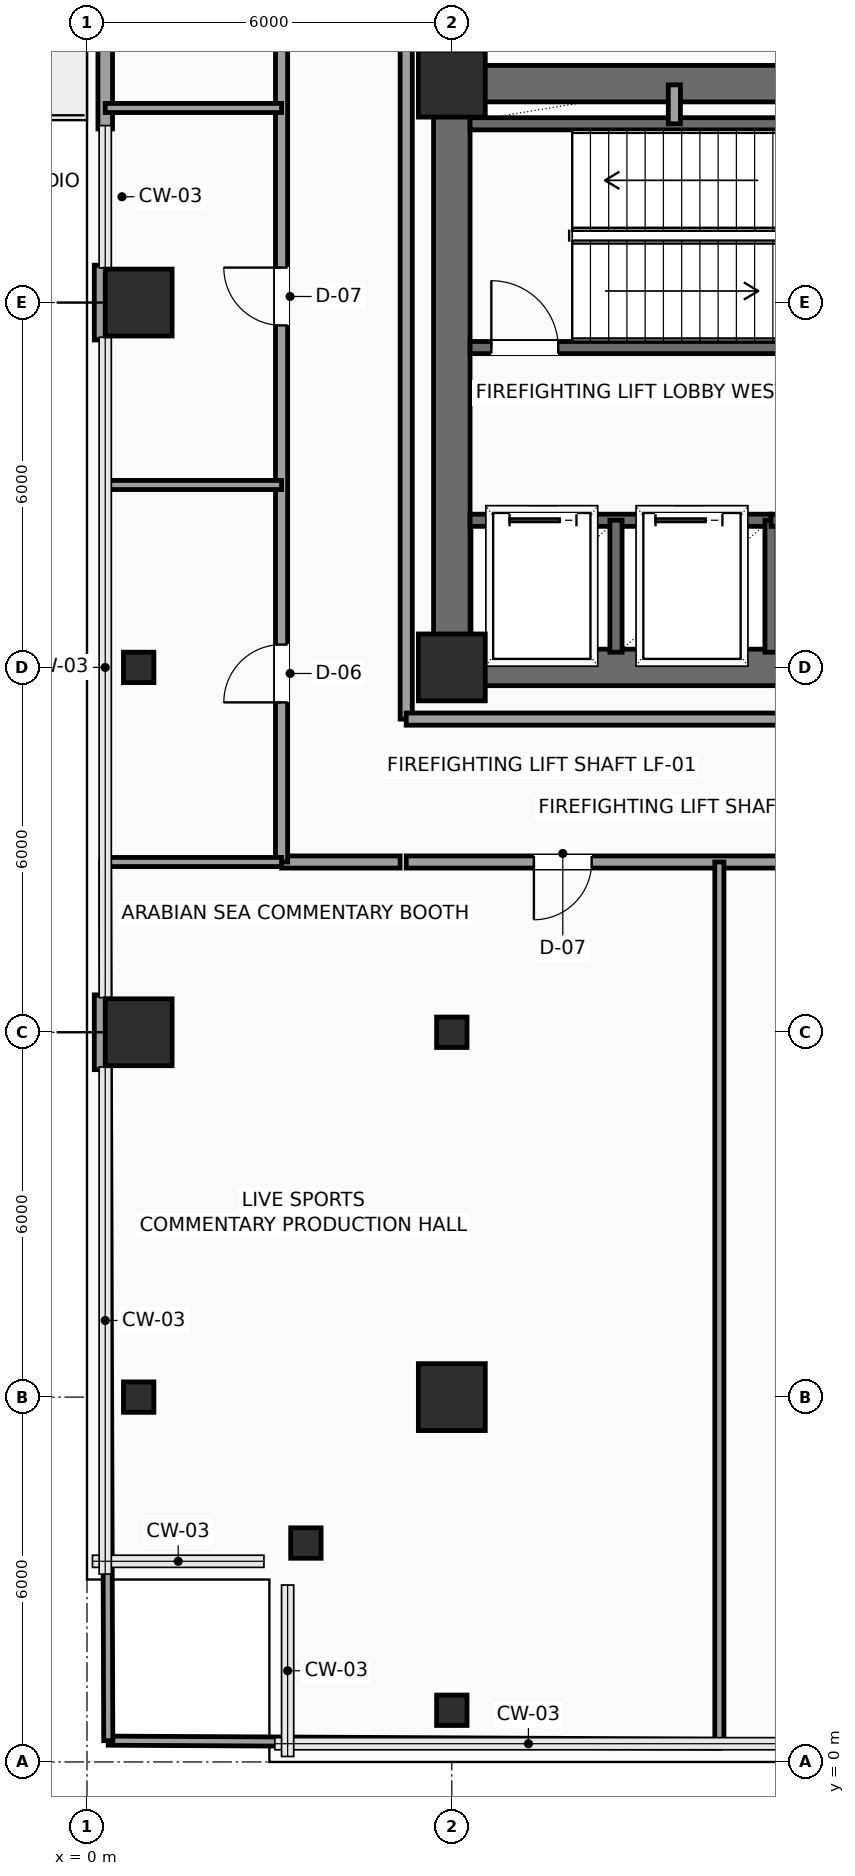
"""IFC4 building model, lengths in metres.
Left out: names, types, materials, properties, quantities, classifications, styles, units other than length and angle.
Written with IfcOpenShell. Run it as: python <this file> out.ifc"""

import sys

from ifc_helpers import new_model, si_unit, direction, frame, frame_2d, origin, origin_2d, place, context, subcontext, project, spatial, rectangle, hollow_rectangle, extrude, element, fill, save


model = new_model("IFC4")
c1 = context("Model", 3, precision=1e-05, world=origin(), true_north=direction((0.0, 1.0)))
c2 = subcontext(c1, "Body", "Model", "MODEL_VIEW")
j1 = project(units=[si_unit("LENGTHUNIT", "METRE"), si_unit("PLANEANGLEUNIT", "RADIAN")], contexts=[c1])
p1 = place(None, origin())
s1 = spatial("IfcSite", under=j1, at=p1, CompositionType="ELEMENT")
p2 = place(p1, origin())
s2 = spatial("IfcBuilding", under=s1, at=p2, CompositionType="ELEMENT")
p3 = place(p2, frame((0.0, 0.0, 107.1)))
s3 = spatial("IfcBuildingStorey", under=s2, at=p3, CompositionType="ELEMENT", Elevation=107.1)
for number, where, z_axis, x_axis in (
    (1, (6.0, 18.0, 0.0), (0.0, 0.0, 1.0), (1.0, 0.0, 0.0)),
    (2, (6.0, 27.6, 0.0), (0.0, 0.0, 1.0), (1.0, 0.0, 0.0)),
):
    element("IfcColumn", number, at=place(p3, frame(where, z_axis=z_axis, x_axis=x_axis)), inside=s3, PredefinedType="COLUMN", context=c2, shape_type="SweptSolid", body=[
        extrude(rectangle(XDim=1.1, YDim=1.1, at=origin_2d()), origin(), (0.0, 0.0, 1.0), 3.75),
    ])
for number, where, z_axis, x_axis in (
    (3, (3.6, 3.6, 0.0), (0.0, 0.0, 1.0), (1.0, 0.0, 0.0)),
    (4, (0.85, 6.0, 0.0), (0.0, 0.0, 1.0), (1.0, 0.0, 0.0)),
):
    element("IfcColumn", number, at=place(p3, frame(where, z_axis=z_axis, x_axis=x_axis)), inside=s3, PredefinedType="COLUMN", context=c2, shape_type="SweptSolid", body=[
        extrude(hollow_rectangle(XDim=0.5, YDim=0.5, WallThickness=0.025, InnerFilletRadius=0.025, OuterFilletRadius=0.04, at=origin_2d()), origin(), (0.0, 0.0, 1.0), 3.75),
    ])
p4 = place(p3, frame((0.85, 12.0, 0.0), z_axis=(0.0, 0.0, 1.0), x_axis=(1.0, 0.0, 0.0)))
e5 = element("IfcColumn", 5, at=p4, inside=s3, PredefinedType="COLUMN", context=c2, shape_type="SweptSolid", body=[
    extrude(rectangle(XDim=1.1, YDim=1.1, at=origin_2d()), origin(), (0.0, 0.0, 1.0), 3.75),
])
p5 = place(p3, frame((0.85, 18.0, 0.0), z_axis=(0.0, 0.0, 1.0), x_axis=(1.0, 0.0, 0.0)))
e6 = element("IfcColumn", 6, at=p5, inside=s3, PredefinedType="COLUMN", context=c2, shape_type="SweptSolid", body=[
    extrude(hollow_rectangle(XDim=0.5, YDim=0.5, WallThickness=0.025, InnerFilletRadius=0.025, OuterFilletRadius=0.04, at=origin_2d()), origin(), (0.0, 0.0, 1.0), 3.75),
])
p6 = place(p3, frame((0.85, 24.0, 0.0), z_axis=(0.0, 0.0, 1.0), x_axis=(1.0, 0.0, 0.0)))
e7 = element("IfcColumn", 7, at=p6, inside=s3, PredefinedType="COLUMN", context=c2, shape_type="SweptSolid", body=[
    extrude(rectangle(XDim=1.1, YDim=1.1, at=origin_2d()), origin(), (0.0, 0.0, 1.0), 3.75),
])
p7 = place(p3, frame((6.0, 0.85, 0.0), z_axis=(0.0, 0.0, 1.0), x_axis=(1.0, 0.0, 0.0)))
e8 = element("IfcColumn", 8, at=p7, inside=s3, PredefinedType="COLUMN", context=c2, shape_type="SweptSolid", body=[
    extrude(hollow_rectangle(XDim=0.5, YDim=0.5, WallThickness=0.025, InnerFilletRadius=0.025, OuterFilletRadius=0.04, at=origin_2d()), origin(), (0.0, 0.0, 1.0), 3.75),
])
p8 = place(p3, frame((6.0, 6.0, 0.0), z_axis=(0.0, 0.0, 1.0), x_axis=(1.0, 0.0, 0.0)))
e9 = element("IfcColumn", 9, at=p8, inside=s3, PredefinedType="COLUMN", context=c2, shape_type="SweptSolid", body=[
    extrude(rectangle(XDim=1.1, YDim=1.1, at=origin_2d()), origin(), (0.0, 0.0, 1.0), 3.75),
])
p9 = place(p3, frame((6.0, 12.0, 0.0), z_axis=(0.0, 0.0, 1.0), x_axis=(1.0, 0.0, 0.0)))
e10 = element("IfcColumn", 10, at=p9, inside=s3, PredefinedType="COLUMN", context=c2, shape_type="SweptSolid", body=[
    extrude(hollow_rectangle(XDim=0.5, YDim=0.5, WallThickness=0.025, InnerFilletRadius=0.025, OuterFilletRadius=0.04, at=origin_2d()), origin(), (0.0, 0.0, 1.0), 3.75),
])
p10 = place(p3, frame((0.3, 26.855, 0.0), z_axis=(0.0, 0.0, 1.0), x_axis=(0.0, 1.0, 0.0)))
e11 = element("IfcWall", 11, at=p10, inside=s3, PredefinedType="SOLIDWALL", context=c2, shape_type="SweptSolid", body=[
    extrude(rectangle(XDim=9.29, YDim=0.24, at=frame_2d((4.645, 0.0))), origin(), (0.0, 0.0, 1.0), 3.475),
])
p11 = place(p10, frame((3.945, 0.0, 0.0)))
e12 = element("IfcOpeningElement", 12, at=p11, cuts=e11, PredefinedType="OPENING", context=c2, shape_type="SweptSolid", body=[
    extrude(rectangle(XDim=1.05, YDim=2.2, at=frame_2d((0.525, 1.1))), frame((0.0, 0.13, 0.0), z_axis=(0.0, -1.0, 0.0), x_axis=(1.0, 0.0, 0.0)), (0.0, 0.0, 1.0), 0.26),
])
for number, where, z_axis, x_axis in (
    (13, (0.24, 11.385, 0.0), (0.0, 0.0, 1.0), (0.0, 1.0, 0.0)),
    (14, (0.24, 23.385, 0.0), (0.0, 0.0, 1.0), (0.0, 1.0, 0.0)),
):
    element("IfcWall", number, at=place(p3, frame(where, z_axis=z_axis, x_axis=x_axis)), inside=s3, PredefinedType="SOLIDWALL", context=c2, shape_type="SweptSolid", body=[
        extrude(rectangle(XDim=1.23, YDim=0.24, at=frame_2d((0.615, 0.0))), origin(), (0.0, 0.0, 1.0), 3.475),
    ])
p12 = place(p3, frame((6.0, 18.0, 0.0), z_axis=(0.0, 0.0, 1.0), x_axis=(1.0, 0.0, 0.0)))
e15 = element("IfcWall", 15, at=p12, inside=s3, PredefinedType="SHEAR", context=c2, shape_type="SweptSolid", body=[
    extrude(rectangle(XDim=12.0, YDim=0.6, at=frame_2d((6.0, 0.0))), origin(), (0.0, 0.0, 1.0), 3.475),
])
p13 = place(p12, frame((7.15, 0.0, 0.0)))
e16 = element("IfcOpeningElement", 16, at=p13, cuts=e15, PredefinedType="OPENING", context=c2, shape_type="SweptSolid", body=[
    extrude(rectangle(XDim=1.6, YDim=2.3, at=frame_2d((0.8, 1.15))), frame((0.0, 0.31, 0.0), z_axis=(0.0, -1.0, 0.0), x_axis=(1.0, 0.0, 0.0)), (0.0, 0.0, 1.0), 0.62),
])
p14 = place(p3, frame((6.0, 27.6, 0.0), z_axis=(0.0, 0.0, 1.0), x_axis=(1.0, 0.0, 0.0)))
e17 = element("IfcWall", 17, at=p14, inside=s3, PredefinedType="SHEAR", context=c2, shape_type="SweptSolid", body=[
    extrude(rectangle(XDim=12.0, YDim=0.6, at=frame_2d((6.0, 0.0))), origin(), (0.0, 0.0, 1.0), 3.475),
])
p15 = place(p14, frame((10.2, 0.0, 0.0)))
e18 = element("IfcOpeningElement", 18, at=p15, cuts=e17, PredefinedType="OPENING", context=c2, shape_type="SweptSolid", body=[
    extrude(rectangle(XDim=0.9, YDim=2.15, at=frame_2d((0.45, 1.075))), frame((0.0, 0.31, 0.0), z_axis=(0.0, -1.0, 0.0), x_axis=(1.0, 0.0, 0.0)), (0.0, 0.0, 1.0), 0.62),
])
p16 = place(p3, frame((6.0, 18.0, 0.0), z_axis=(0.0, 0.0, 1.0), x_axis=(0.0, 1.0, 0.0)))
e19 = element("IfcWall", 19, at=p16, inside=s3, PredefinedType="SHEAR", context=c2, shape_type="SweptSolid", body=[
    extrude(rectangle(XDim=9.6, YDim=0.6, at=frame_2d((4.8, 0.0))), origin(), (0.0, 0.0, 1.0), 3.475),
])
p17 = place(p3, frame((6.3, 23.26, 0.0), z_axis=(0.0, 0.0, 1.0), x_axis=(1.0, 0.0, 0.0)))
e20 = element("IfcWall", 20, at=p17, inside=s3, PredefinedType="SHEAR", context=c2, shape_type="SweptSolid", body=[
    extrude(rectangle(XDim=8.88, YDim=0.2, at=frame_2d((4.44, 0.0))), origin(), (0.0, 0.0, 1.0), 3.475),
])
p18 = place(p17, frame((0.35, 0.0, 0.0)))
e21 = element("IfcOpeningElement", 21, at=p18, cuts=e20, PredefinedType="OPENING", context=c2, shape_type="SweptSolid", body=[
    extrude(rectangle(XDim=1.1, YDim=2.2, at=frame_2d((0.55, 1.1))), frame((0.0, 0.11, 0.0), z_axis=(0.0, -1.0, 0.0), x_axis=(1.0, 0.0, 0.0)), (0.0, 0.0, 1.0), 0.22),
])
p19 = place(p3, frame((6.3, 26.94, 0.0), z_axis=(0.0, 0.0, 1.0), x_axis=(1.0, 0.0, 0.0)))
e22 = element("IfcWall", 22, at=p19, inside=s3, PredefinedType="SHEAR", context=c2, shape_type="SweptSolid", body=[
    extrude(rectangle(XDim=8.88, YDim=0.2, at=frame_2d((4.44, 0.0))), origin(), (0.0, 0.0, 1.0), 3.475),
])
p20 = place(p3, frame((6.3, 20.42, 0.0), z_axis=(0.0, 0.0, 1.0), x_axis=(1.0, 0.0, 0.0)))
e23 = element("IfcWall", 23, at=p20, inside=s3, PredefinedType="SHEAR", context=c2, shape_type="SweptSolid", body=[
    extrude(rectangle(XDim=4.95, YDim=0.2, at=frame_2d((2.475, 0.0))), origin(), (0.0, 0.0, 1.0), 3.475),
])
p21 = place(p20, frame((0.65, 0.0, 0.0)))
e24 = element("IfcOpeningElement", 24, at=p21, cuts=e23, PredefinedType="OPENING", context=c2, shape_type="SweptSolid", body=[
    extrude(rectangle(XDim=1.1, YDim=2.2, at=frame_2d((0.55, 1.1))), frame((0.0, 0.11, 0.0), z_axis=(0.0, -1.0, 0.0), x_axis=(1.0, 0.0, 0.0)), (0.0, 0.0, 1.0), 0.22),
])
p22 = place(p20, frame((3.05, 0.0, 0.0)))
e25 = element("IfcOpeningElement", 25, at=p22, cuts=e23, PredefinedType="OPENING", context=c2, shape_type="SweptSolid", body=[
    extrude(rectangle(XDim=1.1, YDim=2.2, at=frame_2d((0.55, 1.1))), frame((0.0, 0.11, 0.0), z_axis=(0.0, -1.0, 0.0), x_axis=(1.0, 0.0, 0.0)), (0.0, 0.0, 1.0), 0.22),
])
for number, where, z_axis, x_axis in (
    (26, (8.7, 18.25, 0.0), (0.0, 0.0, 1.0), (0.0, 1.0, 0.0)),
    (27, (11.25, 18.25, 0.0), (0.0, 0.0, 1.0), (0.0, 1.0, 0.0)),
):
    element("IfcWall", number, at=place(p3, frame(where, z_axis=z_axis, x_axis=x_axis)), inside=s3, PredefinedType="SHEAR", context=c2, shape_type="SweptSolid", body=[
        extrude(rectangle(XDim=2.17, YDim=0.2, at=frame_2d((1.085, 0.0))), origin(), (0.0, 0.0, 1.0), 3.475),
    ])
p23 = place(p3, frame((11.25, 20.42, 0.0), z_axis=(0.0, 0.0, 1.0), x_axis=(1.0, 0.0, 0.0)))
e28 = element("IfcWall", 28, at=p23, inside=s3, PredefinedType="SHEAR", context=c2, shape_type="SweptSolid", body=[
    extrude(rectangle(XDim=1.4, YDim=0.2, at=frame_2d((0.7, 0.0))), origin(), (0.0, 0.0, 1.0), 3.475),
])
p24 = place(p3, frame((9.66, 26.94, 0.0), z_axis=(0.0, 0.0, 1.0), x_axis=(0.0, 1.0, 0.0)))
e29 = element("IfcWall", 29, at=p24, inside=s3, PredefinedType="SOLIDWALL", context=c2, shape_type="SweptSolid", body=[
    extrude(rectangle(XDim=0.64, YDim=0.2, at=frame_2d((0.32, 0.0))), origin(), (0.0, 0.0, 1.0), 3.475),
])
p25 = place(p3, frame((12.4, 14.8, 0.0), z_axis=(0.0, 0.0, 1.0), x_axis=(-1.0, 0.0, 0.0)))
e30 = element("IfcWall", 30, at=p25, inside=s3, PredefinedType="PARTITIONING", context=c2, shape_type="SweptSolid", body=[
    extrude(rectangle(XDim=7.15, YDim=0.2, at=frame_2d((3.575, 0.0))), origin(), (0.0, 0.0, 1.0), 3.017),
])
p26 = place(p25, frame((4.1, 0.0, 0.0)))
e31 = element("IfcOpeningElement", 31, at=p26, cuts=e30, PredefinedType="OPENING", context=c2, shape_type="SweptSolid", body=[
    extrude(rectangle(XDim=0.95, YDim=2.15, at=frame_2d((0.475, 1.075))), frame((0.0, 0.11, 0.0), z_axis=(0.0, -1.0, 0.0), x_axis=(1.0, 0.0, 0.0)), (0.0, 0.0, 1.0), 0.22),
])
p27 = place(p3, frame((5.15, 14.8, 0.0), z_axis=(0.0, 0.0, 1.0), x_axis=(-1.0, 0.0, 0.0)))
e32 = element("IfcWall", 32, at=p27, inside=s3, PredefinedType="PARTITIONING", context=c2, shape_type="SweptSolid", body=[
    extrude(rectangle(XDim=1.95, YDim=0.2, at=frame_2d((0.975, 0.0))), origin(), (0.0, 0.0, 1.0), 3.017),
])
p28 = place(p3, frame((3.2, 14.8, 0.0), z_axis=(0.0, 0.0, 1.0), x_axis=(0.0, 1.0, 0.0)))
e33 = element("IfcWall", 33, at=p28, inside=s3, PredefinedType="PARTITIONING", context=c2, shape_type="SweptSolid", body=[
    extrude(rectangle(XDim=15.45, YDim=0.2, at=frame_2d((7.725, 0.0))), origin(), (0.0, 0.0, 1.0), 3.475),
])
p29 = place(p28, frame((2.625, 0.0, 0.0)))
e34 = element("IfcOpeningElement", 34, at=p29, cuts=e33, PredefinedType="OPENING", context=c2, shape_type="SweptSolid", body=[
    extrude(rectangle(XDim=0.95, YDim=2.15, at=frame_2d((0.475, 1.075))), frame((0.0, 0.11, 0.0), z_axis=(0.0, -1.0, 0.0), x_axis=(1.0, 0.0, 0.0)), (0.0, 0.0, 1.0), 0.22),
])
p30 = place(p28, frame((8.825, 0.0, 0.0)))
e35 = element("IfcOpeningElement", 35, at=p30, cuts=e33, PredefinedType="OPENING", context=c2, shape_type="SweptSolid", body=[
    extrude(rectangle(XDim=0.95, YDim=2.15, at=frame_2d((0.475, 1.075))), frame((0.0, 0.11, 0.0), z_axis=(0.0, -1.0, 0.0), x_axis=(1.0, 0.0, 0.0)), (0.0, 0.0, 1.0), 0.22),
])
p31 = place(p28, frame((13.45, 0.0, 0.0)))
e36 = element("IfcOpeningElement", 36, at=p31, cuts=e33, PredefinedType="OPENING", context=c2, shape_type="SweptSolid", body=[
    extrude(rectangle(XDim=0.95, YDim=2.15, at=frame_2d((0.475, 1.075))), frame((0.0, 0.11, 0.0), z_axis=(0.0, -1.0, 0.0), x_axis=(1.0, 0.0, 0.0)), (0.0, 0.0, 1.0), 0.22),
])
p32 = place(p3, frame((5.25, 30.25, 0.0), z_axis=(0.0, 0.0, 1.0), x_axis=(0.0, -1.0, 0.0)))
e37 = element("IfcWall", 37, at=p32, inside=s3, PredefinedType="PARTITIONING", context=c2, shape_type="SweptSolid", body=[
    extrude(rectangle(XDim=13.1, YDim=0.2, at=frame_2d((6.55, 0.0))), origin(), (0.0, 0.0, 1.0), 3.475),
])
p33 = place(p3, frame((5.25, 17.15, 0.0), z_axis=(0.0, 0.0, 1.0), x_axis=(1.0, 0.0, 0.0)))
e38 = element("IfcWall", 38, at=p33, inside=s3, PredefinedType="PARTITIONING", context=c2, shape_type="SweptSolid", body=[
    extrude(rectangle(XDim=7.15, YDim=0.2, at=frame_2d((3.575, 0.0))), origin(), (0.0, 0.0, 1.0), 3.475),
])
p34 = place(p3, frame((6.3, 27.68, 0.0), z_axis=(0.0, 0.0, 1.0), x_axis=(0.0, 1.0, 0.0)))
e39 = element("IfcWall", 39, at=p34, inside=s3, PredefinedType="PARTITIONING", context=c2, shape_type="SweptSolid", body=[
    extrude(rectangle(XDim=2.57, YDim=0.15, at=frame_2d((1.285, 0.0))), origin(), (0.0, 0.0, 1.0), 2.967),
])
p35 = place(p3, frame((0.35, 0.35, 0.0), z_axis=(0.0, 0.0, 1.0), x_axis=(0.999987599634, -0.004980017926, 0.0)))
e40 = element("IfcWall", 40, at=p35, inside=s3, PredefinedType="PARTITIONING", context=c2, shape_type="SweptSolid", body=[
    extrude(rectangle(XDim=10.05, YDim=0.15, at=frame_2d((5.025, 0.0))), origin(), (0.0, 0.0, 1.0), 3.475),
])
p36 = place(p3, frame((0.35, 0.35, 0.0), z_axis=(0.0, 0.0, 1.0), x_axis=(-0.003473507221, 0.999993967356, 0.0)))
e41 = element("IfcWall", 41, at=p36, inside=s3, PredefinedType="PARTITIONING", context=c2, shape_type="SweptSolid", body=[
    extrude(rectangle(XDim=11.035, YDim=0.15, at=frame_2d((5.518, 0.0))), origin(), (0.0, 0.0, 1.0), 3.475),
])
p37 = place(p3, frame((0.308, 12.615, 0.0), z_axis=(0.0, 0.0, 1.0), x_axis=(-0.003463666374, 0.99999400149, 0.0)))
e42 = element("IfcWall", 42, at=p37, inside=s3, PredefinedType="PARTITIONING", context=c2, shape_type="SweptSolid", body=[
    extrude(rectangle(XDim=2.185, YDim=0.15, at=frame_2d((1.093, 0.0))), origin(), (0.0, 0.0, 1.0), 3.475),
])
p38 = place(p3, frame((10.4, 0.3, 0.0), z_axis=(0.0, 0.0, 1.0), x_axis=(0.0, 1.0, 0.0)))
e43 = element("IfcWall", 43, at=p38, inside=s3, PredefinedType="PARTITIONING", context=c2, shape_type="SweptSolid", body=[
    extrude(rectangle(XDim=14.5, YDim=0.15, at=frame_2d((7.25, 0.0))), origin(), (0.0, 0.0, 1.0), 3.475),
])
for number, where, z_axis, x_axis in (
    (44, (0.3, 14.8, 0.0), (0.0, 0.0, 1.0), (1.0, 0.0, 0.0)),
    (45, (0.3, 21.0, 0.0), (0.0, 0.0, 1.0), (1.0, 0.0, 0.0)),
):
    element("IfcWall", number, at=place(p3, frame(where, z_axis=z_axis, x_axis=x_axis)), inside=s3, PredefinedType="PARTITIONING", context=c2, shape_type="SweptSolid", body=[
        extrude(rectangle(XDim=2.9, YDim=0.15, at=frame_2d((1.45, 0.0))), origin(), (0.0, 0.0, 1.0), 3.017),
    ])
p39 = place(p3, frame((0.3, 27.2, 0.0), z_axis=(0.0, 0.0, 1.0), x_axis=(1.0, 0.0, 0.0)))
e46 = element("IfcWall", 46, at=p39, inside=s3, PredefinedType="PARTITIONING", context=c2, shape_type="SweptSolid", body=[
    extrude(rectangle(XDim=2.9, YDim=0.15, at=frame_2d((1.45, 0.0))), origin(), (0.0, 0.0, 1.0), 3.475),
])
p40 = place(p18, origin())
e47 = element("IfcDoor", 47, at=p40, inside=s3, OperationType="SINGLE_SWING_LEFT", PredefinedType="DOOR", context=c2, shape_type="SweptSolid", body=[
    extrude(rectangle(XDim=1.1, YDim=2.2, at=frame_2d((0.55, 1.1))), frame((0.0, 0.025, 0.0), z_axis=(0.0, -1.0, 0.0), x_axis=(1.0, 0.0, 0.0)), (0.0, 0.0, 1.0), 0.05),
])
fill(e21, e47)
p41 = place(p21, origin())
e48 = element("IfcDoor", 48, at=p41, inside=s3, OperationType="SLIDING_TO_LEFT", PredefinedType="DOOR", context=c2, shape_type="SweptSolid", body=[
    extrude(rectangle(XDim=1.1, YDim=2.2, at=frame_2d((0.55, 1.1))), frame((0.0, 0.025, 0.0), z_axis=(0.0, -1.0, 0.0), x_axis=(1.0, 0.0, 0.0)), (0.0, 0.0, 1.0), 0.05),
])
fill(e24, e48)
p42 = place(p22, origin())
e49 = element("IfcDoor", 49, at=p42, inside=s3, OperationType="SLIDING_TO_LEFT", PredefinedType="DOOR", context=c2, shape_type="SweptSolid", body=[
    extrude(rectangle(XDim=1.1, YDim=2.2, at=frame_2d((0.55, 1.1))), frame((0.0, 0.025, 0.0), z_axis=(0.0, -1.0, 0.0), x_axis=(1.0, 0.0, 0.0)), (0.0, 0.0, 1.0), 0.05),
])
fill(e25, e49)
p43 = place(p26, origin())
e50 = element("IfcDoor", 50, at=p43, inside=s3, OperationType="SINGLE_SWING_RIGHT", PredefinedType="DOOR", context=c2, shape_type="SweptSolid", body=[
    extrude(rectangle(XDim=0.95, YDim=2.15, at=frame_2d((0.475, 1.075))), frame((0.0, 0.025, 0.0), z_axis=(0.0, -1.0, 0.0), x_axis=(1.0, 0.0, 0.0)), (0.0, 0.0, 1.0), 0.05),
])
fill(e31, e50)
p44 = place(p29, origin())
e51 = element("IfcDoor", 51, at=p44, inside=s3, OperationType="SINGLE_SWING_LEFT", PredefinedType="DOOR", context=c2, shape_type="SweptSolid", body=[
    extrude(rectangle(XDim=0.95, YDim=2.15, at=frame_2d((0.475, 1.075))), frame((0.0, 0.025, 0.0), z_axis=(0.0, -1.0, 0.0), x_axis=(1.0, 0.0, 0.0)), (0.0, 0.0, 1.0), 0.05),
])
fill(e34, e51)
p45 = place(p30, origin())
e52 = element("IfcDoor", 52, at=p45, inside=s3, OperationType="SINGLE_SWING_RIGHT", PredefinedType="DOOR", context=c2, shape_type="SweptSolid", body=[
    extrude(rectangle(XDim=0.95, YDim=2.15, at=frame_2d((0.475, 1.075))), frame((0.0, 0.025, 0.0), z_axis=(0.0, -1.0, 0.0), x_axis=(1.0, 0.0, 0.0)), (0.0, 0.0, 1.0), 0.05),
])
fill(e35, e52)
save(model, sys.argv[1])
